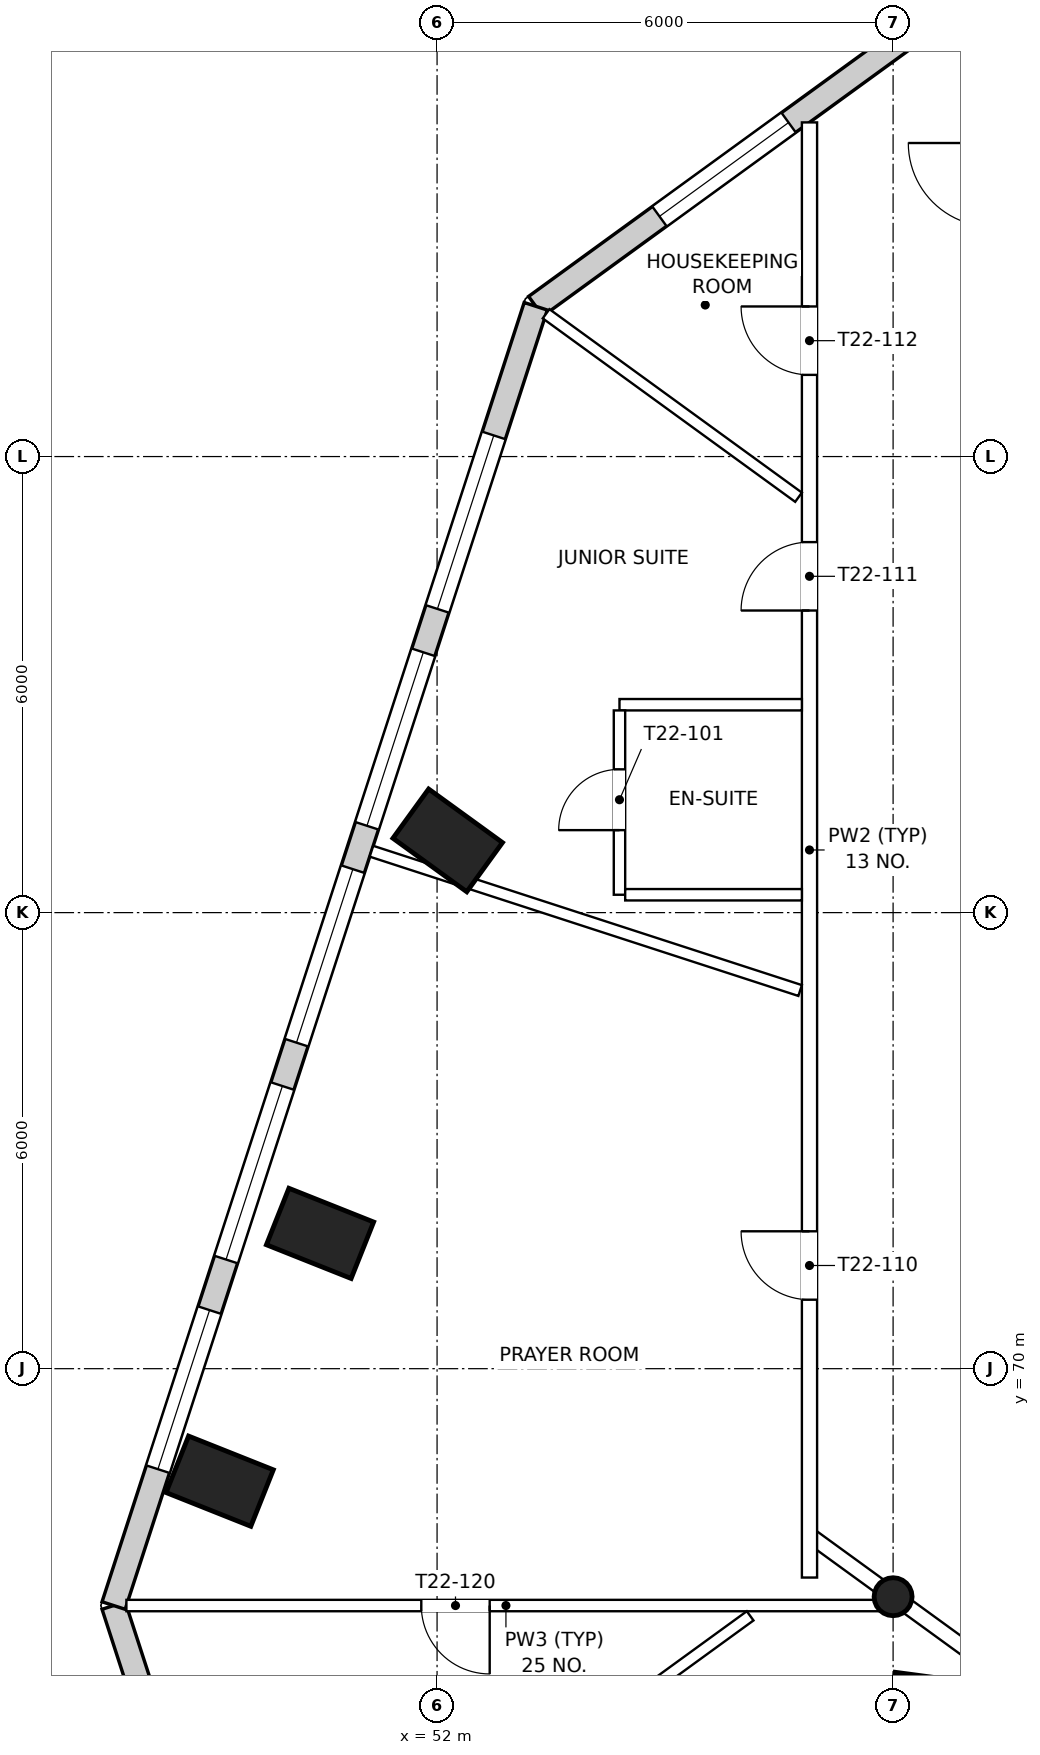
"""IFC4 building model, lengths in metres.
Left out: names, types, materials, properties, quantities, classifications, styles, units other than length and angle.
Written with IfcOpenShell. Run it as: python <this file> out.ifc"""

import sys

from ifc_helpers import new_model, si_unit, direction, frame, frame_2d, origin, origin_2d, place, context, subcontext, project, spatial, rectangle, circle, extrude, element, fill, save


model = new_model("IFC4")
c1 = context("Model", 3, precision=1e-05, world=origin(), true_north=direction((0.0, 1.0)))
c2 = subcontext(c1, "Body", "Model", "MODEL_VIEW")
j1 = project(units=[si_unit("LENGTHUNIT", "METRE"), si_unit("PLANEANGLEUNIT", "RADIAN")], contexts=[c1])
p1 = place(None, origin())
s1 = spatial("IfcSite", under=j1, at=p1, CompositionType="ELEMENT")
p2 = place(p1, origin())
s2 = spatial("IfcBuilding", under=s1, at=p2, CompositionType="ELEMENT")
p3 = place(p2, frame((0.0, 0.0, 313.9)))
s3 = spatial("IfcBuildingStorey", under=s2, at=p3, CompositionType="ELEMENT", Elevation=313.9)
for number, where, z_axis, x_axis in (
    (1, (52.14, 76.95, 0.0), (0.0, 0.0, 1.0), (0.587, 0.81, 0.0)),
    (2, (50.46, 71.78, 0.0), (0.0, 0.0, 1.0), (0.37, 0.929, 0.0)),
    (3, (49.14, 68.52, 0.0), (0.0, 0.0, 1.0), (0.37, 0.929, 0.0)),
    (4, (58.57, 65.53, 0.0), (0.0, 0.0, 1.0), (0.133, 0.991, 0.0)),
):
    element("IfcColumn", number, at=place(p3, frame(where, z_axis=z_axis, x_axis=x_axis)), inside=s3, PredefinedType="COLUMN", context=c2, shape_type="SweptSolid", body=[
        extrude(rectangle(XDim=0.8, YDim=1.2, at=origin_2d()), origin(), (0.0, 0.0, 1.0), 3.9),
    ])
p4 = place(p3, frame((58.0, 67.0, 0.0), z_axis=(0.0, 0.0, 1.0), x_axis=(1.0, 0.0, 0.0)))
e5 = element("IfcColumn", 5, at=p4, inside=s3, PredefinedType="COLUMN", context=c2, shape_type="SweptSolid", body=[
    extrude(circle(Radius=0.25, at=origin_2d()), origin(), (0.0, 0.0, 1.0), 3.9),
])
p5 = place(p3, frame((47.744, 66.884, 0.0), z_axis=(0.0, 0.0, 1.0), x_axis=(0.30904851291, -0.951046274725, 0.0)))
e6 = element("IfcWall", 6, at=p5, inside=s3, PredefinedType="SOLIDWALL", context=c2, shape_type="SweptSolid", body=[
    extrude(rectangle(XDim=5.291, YDim=0.32, at=frame_2d((2.646, 0.0))), origin(), (0.0, 0.0, 1.0), 3.6),
])
p6 = place(p3, frame((58.615, 87.84, 0.0), z_axis=(0.0, 0.0, 1.0), x_axis=(-0.809010691028, -0.587793928007, 0.0)))
e7 = element("IfcWall", 7, at=p6, inside=s3, PredefinedType="SOLIDWALL", context=c2, shape_type="SweptSolid", body=[
    extrude(rectangle(XDim=6.572, YDim=0.32, at=frame_2d((3.286, 0.0))), origin(), (0.0, 0.0, 1.0), 3.6),
])
p7 = place(p6, frame((2.46, 0.0, 0.75)))
e8 = element("IfcOpeningElement", 8, at=p7, cuts=e7, PredefinedType="OPENING", context=c2, shape_type="SweptSolid", body=[
    extrude(rectangle(XDim=2.1, YDim=2.1, at=frame_2d((1.05, 1.05))), frame((0.0, 0.17, 0.0), z_axis=(0.0, -1.0, 0.0), x_axis=(1.0, 0.0, 0.0)), (0.0, 0.0, 1.0), 0.34),
])
p8 = place(p3, frame((53.298, 83.977, 0.0), z_axis=(0.0, 0.0, 1.0), x_axis=(-0.309017883781, -0.951056227309, 0.0)))
e9 = element("IfcWall", 9, at=p8, inside=s3, PredefinedType="SOLIDWALL", context=c2, shape_type="SweptSolid", body=[
    extrude(rectangle(XDim=17.973, YDim=0.32, at=frame_2d((8.986, 0.0))), origin(), (0.0, 0.0, 1.0), 3.6),
])
p9 = place(p8, frame((1.787, 0.0, 0.55)))
e10 = element("IfcOpeningElement", 10, at=p9, cuts=e9, PredefinedType="OPENING", context=c2, shape_type="SweptSolid", body=[
    extrude(rectangle(XDim=2.4, YDim=2.3, at=frame_2d((1.2, 1.15))), frame((0.0, 0.17, 0.0), z_axis=(0.0, -1.0, 0.0), x_axis=(1.0, 0.0, 0.0)), (0.0, 0.0, 1.0), 0.34),
])
p10 = place(p8, frame((4.787, 0.0, 0.55)))
e11 = element("IfcOpeningElement", 11, at=p10, cuts=e9, PredefinedType="OPENING", context=c2, shape_type="SweptSolid", body=[
    extrude(rectangle(XDim=2.4, YDim=2.3, at=frame_2d((1.2, 1.15))), frame((0.0, 0.17, 0.0), z_axis=(0.0, -1.0, 0.0), x_axis=(1.0, 0.0, 0.0)), (0.0, 0.0, 1.0), 0.34),
])
p11 = place(p8, frame((7.787, 0.0, 0.55)))
e12 = element("IfcOpeningElement", 12, at=p11, cuts=e9, PredefinedType="OPENING", context=c2, shape_type="SweptSolid", body=[
    extrude(rectangle(XDim=2.4, YDim=2.3, at=frame_2d((1.2, 1.15))), frame((0.0, 0.17, 0.0), z_axis=(0.0, -1.0, 0.0), x_axis=(1.0, 0.0, 0.0)), (0.0, 0.0, 1.0), 0.34),
])
p12 = place(p8, frame((10.787, 0.0, 0.55)))
e13 = element("IfcOpeningElement", 13, at=p12, cuts=e9, PredefinedType="OPENING", context=c2, shape_type="SweptSolid", body=[
    extrude(rectangle(XDim=2.4, YDim=2.3, at=frame_2d((1.2, 1.15))), frame((0.0, 0.17, 0.0), z_axis=(0.0, -1.0, 0.0), x_axis=(1.0, 0.0, 0.0)), (0.0, 0.0, 1.0), 0.34),
])
p13 = place(p8, frame((13.886, 0.0, 0.75)))
e14 = element("IfcOpeningElement", 14, at=p13, cuts=e9, PredefinedType="OPENING", context=c2, shape_type="SweptSolid", body=[
    extrude(rectangle(XDim=2.2, YDim=2.1, at=frame_2d((1.1, 1.05))), frame((0.0, 0.17, 0.0), z_axis=(0.0, -1.0, 0.0), x_axis=(1.0, 0.0, 0.0)), (0.0, 0.0, 1.0), 0.34),
])
p14 = place(p3, frame((62.349, 63.85, 0.0), z_axis=(0.0, 0.0, 1.0), x_axis=(-0.809033820778, 0.587762092038, 0.0)))
e15 = element("IfcWall", 15, at=p14, inside=s3, PredefinedType="PARTITIONING", context=c2, shape_type="SweptSolid", body=[
    extrude(rectangle(XDim=6.735, YDim=0.2, at=frame_2d((3.367, 0.0))), origin(), (0.0, 0.0, 1.0), 3.6),
])
p15 = place(p14, frame((2.45, 0.0, 0.0)))
e16 = element("IfcOpeningElement", 16, at=p15, cuts=e15, PredefinedType="OPENING", context=c2, shape_type="SweptSolid", body=[
    extrude(rectangle(XDim=0.9, YDim=2.1, at=frame_2d((0.45, 1.05))), frame((0.0, 0.11, 0.0), z_axis=(0.0, -1.0, 0.0), x_axis=(1.0, 0.0, 0.0)), (0.0, 0.0, 1.0), 0.22),
])
p16 = place(p3, frame((56.9, 67.252, 0.0), z_axis=(0.0, 0.0, 1.0), x_axis=(0.0, 1.0, 0.0)))
e17 = element("IfcWall", 17, at=p16, inside=s3, PredefinedType="PARTITIONING", context=c2, shape_type="SweptSolid", body=[
    extrude(rectangle(XDim=19.144, YDim=0.2, at=frame_2d((9.572, 0.0))), origin(), (0.0, 0.0, 1.0), 3.15),
])
p17 = place(p16, frame((3.656, 0.0, 0.0)))
e18 = element("IfcOpeningElement", 18, at=p17, cuts=e17, PredefinedType="OPENING", context=c2, shape_type="SweptSolid", body=[
    extrude(rectangle(XDim=0.9, YDim=2.1, at=frame_2d((0.45, 1.05))), frame((0.0, 0.11, 0.0), z_axis=(0.0, -1.0, 0.0), x_axis=(1.0, 0.0, 0.0)), (0.0, 0.0, 1.0), 0.22),
])
p18 = place(p16, frame((12.722, 0.0, 0.0)))
e19 = element("IfcOpeningElement", 19, at=p18, cuts=e17, PredefinedType="OPENING", context=c2, shape_type="SweptSolid", body=[
    extrude(rectangle(XDim=0.9, YDim=2.1, at=frame_2d((0.45, 1.05))), frame((0.0, 0.11, 0.0), z_axis=(0.0, -1.0, 0.0), x_axis=(1.0, 0.0, 0.0)), (0.0, 0.0, 1.0), 0.22),
])
p19 = place(p16, frame((15.823, 0.0, 0.0)))
e20 = element("IfcOpeningElement", 20, at=p19, cuts=e17, PredefinedType="OPENING", context=c2, shape_type="SweptSolid", body=[
    extrude(rectangle(XDim=0.9, YDim=2.1, at=frame_2d((0.45, 1.05))), frame((0.0, 0.11, 0.0), z_axis=(0.0, -1.0, 0.0), x_axis=(1.0, 0.0, 0.0)), (0.0, 0.0, 1.0), 0.22),
])
p20 = place(p3, frame((53.434, 83.878, 0.0), z_axis=(0.0, 0.0, 1.0), x_axis=(0.809005997221, -0.587800388279, 0.0)))
e21 = element("IfcWall", 21, at=p20, inside=s3, PredefinedType="PARTITIONING", context=c2, shape_type="SweptSolid", body=[
    extrude(rectangle(XDim=4.106, YDim=0.15, at=frame_2d((2.053, 0.0))), origin(), (0.0, 0.0, 1.0), 3.6),
])
p21 = place(p3, frame((47.913, 66.884, 0.0), z_axis=(0.0, 0.0, 1.0), x_axis=(1.0, 0.0, 0.0)))
e22 = element("IfcWall", 22, at=p21, inside=s3, PredefinedType="PARTITIONING", context=c2, shape_type="SweptSolid", body=[
    extrude(rectangle(XDim=9.987, YDim=0.15, at=frame_2d((4.994, 0.0))), origin(), (0.0, 0.0, 1.0), 3.15),
])
p22 = place(p21, frame((3.88, 0.0, 0.0)))
e23 = element("IfcOpeningElement", 23, at=p22, cuts=e22, PredefinedType="OPENING", context=c2, shape_type="SweptSolid", body=[
    extrude(rectangle(XDim=0.9, YDim=2.1, at=frame_2d((0.45, 1.05))), frame((0.0, 0.085, 0.0), z_axis=(0.0, -1.0, 0.0), x_axis=(1.0, 0.0, 0.0)), (0.0, 0.0, 1.0), 0.17),
])
p23 = place(p3, frame((52.626, 64.211, 0.0), z_axis=(0.0, 0.0, 1.0), x_axis=(0.809014773285, 0.587788309348, 0.0)))
e24 = element("IfcWall", 24, at=p23, inside=s3, PredefinedType="PARTITIONING", context=c2, shape_type="SweptSolid", body=[
    extrude(rectangle(XDim=4.317, YDim=0.15, at=frame_2d((2.159, 0.0))), origin(), (0.0, 0.0, 1.0), 3.6),
])
p24 = place(p3, frame((51.137, 76.808, 0.0), z_axis=(0.0, 0.0, 1.0), x_axis=(0.951056152135, -0.309018115143, 0.0)))
e25 = element("IfcWall", 25, at=p24, inside=s3, PredefinedType="PARTITIONING", context=c2, shape_type="SweptSolid", body=[
    extrude(rectangle(XDim=5.93, YDim=0.15, at=frame_2d((2.965, 0.0))), origin(), (0.0, 0.0, 1.0), 3.15),
])
p25 = place(p3, frame((56.8, 78.735, 0.0), z_axis=(0.0, 0.0, 1.0), x_axis=(-1.0, 0.0, 0.0)))
e26 = element("IfcWall", 26, at=p25, inside=s3, PredefinedType="PARTITIONING", context=c2, shape_type="SweptSolid", body=[
    extrude(rectangle(XDim=2.4, YDim=0.15, at=frame_2d((1.2, 0.0))), origin(), (0.0, 0.0, 1.0), 3.6),
])
p26 = place(p3, frame((54.4, 76.235, 0.0), z_axis=(0.0, 0.0, 1.0), x_axis=(0.0, 1.0, 0.0)))
e27 = element("IfcWall", 27, at=p26, inside=s3, PredefinedType="PARTITIONING", context=c2, shape_type="SweptSolid", body=[
    extrude(rectangle(XDim=2.425, YDim=0.15, at=frame_2d((1.212, 0.0))), origin(), (0.0, 0.0, 1.0), 3.15),
])
p27 = place(p26, frame((0.85, 0.0, 0.0)))
e28 = element("IfcOpeningElement", 28, at=p27, cuts=e27, PredefinedType="OPENING", context=c2, shape_type="SweptSolid", body=[
    extrude(rectangle(XDim=0.8, YDim=2.1, at=frame_2d((0.4, 1.05))), frame((0.0, 0.085, 0.0), z_axis=(0.0, -1.0, 0.0), x_axis=(1.0, 0.0, 0.0)), (0.0, 0.0, 1.0), 0.17),
])
p28 = place(p3, frame((56.8, 76.235, 0.0), z_axis=(0.0, 0.0, 1.0), x_axis=(-1.0, 0.0, 0.0)))
e29 = element("IfcWall", 29, at=p28, inside=s3, PredefinedType="PARTITIONING", context=c2, shape_type="SweptSolid", body=[
    extrude(rectangle(XDim=2.325, YDim=0.15, at=frame_2d((1.163, 0.0))), origin(), (0.0, 0.0, 1.0), 3.6),
])
p29 = place(p7, origin())
e30 = element("IfcWindow", 30, at=p29, inside=s3, PartitioningType="SINGLE_PANEL", PredefinedType="WINDOW", context=c2, shape_type="SweptSolid", body=[
    extrude(rectangle(XDim=2.1, YDim=2.1, at=frame_2d((1.05, 1.05))), frame((0.0, 0.07, 0.0), z_axis=(0.0, -1.0, 0.0), x_axis=(1.0, 0.0, 0.0)), (0.0, 0.0, 1.0), 0.06),
])
fill(e8, e30)
p30 = place(p9, origin())
e31 = element("IfcWindow", 31, at=p30, inside=s3, PartitioningType="SINGLE_PANEL", PredefinedType="WINDOW", context=c2, shape_type="SweptSolid", body=[
    extrude(rectangle(XDim=2.4, YDim=2.3, at=frame_2d((1.2, 1.15))), frame((0.0, 0.07, 0.0), z_axis=(0.0, -1.0, 0.0), x_axis=(1.0, 0.0, 0.0)), (0.0, 0.0, 1.0), 0.06),
])
fill(e10, e31)
p31 = place(p10, origin())
e32 = element("IfcWindow", 32, at=p31, inside=s3, PartitioningType="SINGLE_PANEL", PredefinedType="WINDOW", context=c2, shape_type="SweptSolid", body=[
    extrude(rectangle(XDim=2.4, YDim=2.3, at=frame_2d((1.2, 1.15))), frame((0.0, 0.07, 0.0), z_axis=(0.0, -1.0, 0.0), x_axis=(1.0, 0.0, 0.0)), (0.0, 0.0, 1.0), 0.06),
])
fill(e11, e32)
p32 = place(p11, origin())
e33 = element("IfcWindow", 33, at=p32, inside=s3, PartitioningType="SINGLE_PANEL", PredefinedType="WINDOW", context=c2, shape_type="SweptSolid", body=[
    extrude(rectangle(XDim=2.4, YDim=2.3, at=frame_2d((1.2, 1.15))), frame((0.0, 0.07, 0.0), z_axis=(0.0, -1.0, 0.0), x_axis=(1.0, 0.0, 0.0)), (0.0, 0.0, 1.0), 0.06),
])
fill(e12, e33)
p33 = place(p12, origin())
e34 = element("IfcWindow", 34, at=p33, inside=s3, PartitioningType="SINGLE_PANEL", PredefinedType="WINDOW", context=c2, shape_type="SweptSolid", body=[
    extrude(rectangle(XDim=2.4, YDim=2.3, at=frame_2d((1.2, 1.15))), frame((0.0, 0.07, 0.0), z_axis=(0.0, -1.0, 0.0), x_axis=(1.0, 0.0, 0.0)), (0.0, 0.0, 1.0), 0.06),
])
fill(e13, e34)
p34 = place(p13, origin())
e35 = element("IfcWindow", 35, at=p34, inside=s3, PartitioningType="SINGLE_PANEL", PredefinedType="WINDOW", context=c2, shape_type="SweptSolid", body=[
    extrude(rectangle(XDim=2.2, YDim=2.1, at=frame_2d((1.1, 1.05))), frame((0.0, 0.07, 0.0), z_axis=(0.0, -1.0, 0.0), x_axis=(1.0, 0.0, 0.0)), (0.0, 0.0, 1.0), 0.06),
])
fill(e14, e35)
p35 = place(p27, origin())
e36 = element("IfcDoor", 36, at=p35, inside=s3, OperationType="SINGLE_SWING_LEFT", PredefinedType="DOOR", context=c2, shape_type="SweptSolid", body=[
    extrude(rectangle(XDim=0.8, YDim=2.1, at=frame_2d((0.4, 1.05))), frame((0.0, 0.025, 0.0), z_axis=(0.0, -1.0, 0.0), x_axis=(1.0, 0.0, 0.0)), (0.0, 0.0, 1.0), 0.05),
])
fill(e28, e36)
p36 = place(p17, origin())
e37 = element("IfcDoor", 37, at=p36, inside=s3, OperationType="SINGLE_SWING_RIGHT", PredefinedType="DOOR", context=c2, shape_type="SweptSolid", body=[
    extrude(rectangle(XDim=0.9, YDim=2.1, at=frame_2d((0.45, 1.05))), frame((0.0, 0.025, 0.0), z_axis=(0.0, -1.0, 0.0), x_axis=(1.0, 0.0, 0.0)), (0.0, 0.0, 1.0), 0.05),
])
fill(e18, e37)
p37 = place(p18, origin())
e38 = element("IfcDoor", 38, at=p37, inside=s3, OperationType="SINGLE_SWING_LEFT", PredefinedType="DOOR", context=c2, shape_type="SweptSolid", body=[
    extrude(rectangle(XDim=0.9, YDim=2.1, at=frame_2d((0.45, 1.05))), frame((0.0, 0.025, 0.0), z_axis=(0.0, -1.0, 0.0), x_axis=(1.0, 0.0, 0.0)), (0.0, 0.0, 1.0), 0.05),
])
fill(e19, e38)
p38 = place(p19, origin())
e39 = element("IfcDoor", 39, at=p38, inside=s3, OperationType="SINGLE_SWING_RIGHT", PredefinedType="DOOR", context=c2, shape_type="SweptSolid", body=[
    extrude(rectangle(XDim=0.9, YDim=2.1, at=frame_2d((0.45, 1.05))), frame((0.0, 0.025, 0.0), z_axis=(0.0, -1.0, 0.0), x_axis=(1.0, 0.0, 0.0)), (0.0, 0.0, 1.0), 0.05),
])
fill(e20, e39)
p39 = place(p22, frame((0.9, 0.0, 0.0), z_axis=(0.0, 0.0, 1.0), x_axis=(-1.0, 0.0, 0.0)))
e40 = element("IfcDoor", 40, at=p39, inside=s3, OperationType="SINGLE_SWING_LEFT", PredefinedType="DOOR", context=c2, shape_type="SweptSolid", body=[
    extrude(rectangle(XDim=0.9, YDim=2.1, at=frame_2d((0.45, 1.05))), frame((0.0, 0.025, 0.0), z_axis=(0.0, -1.0, 0.0), x_axis=(1.0, 0.0, 0.0)), (0.0, 0.0, 1.0), 0.05),
])
fill(e23, e40)
save(model, sys.argv[1])
